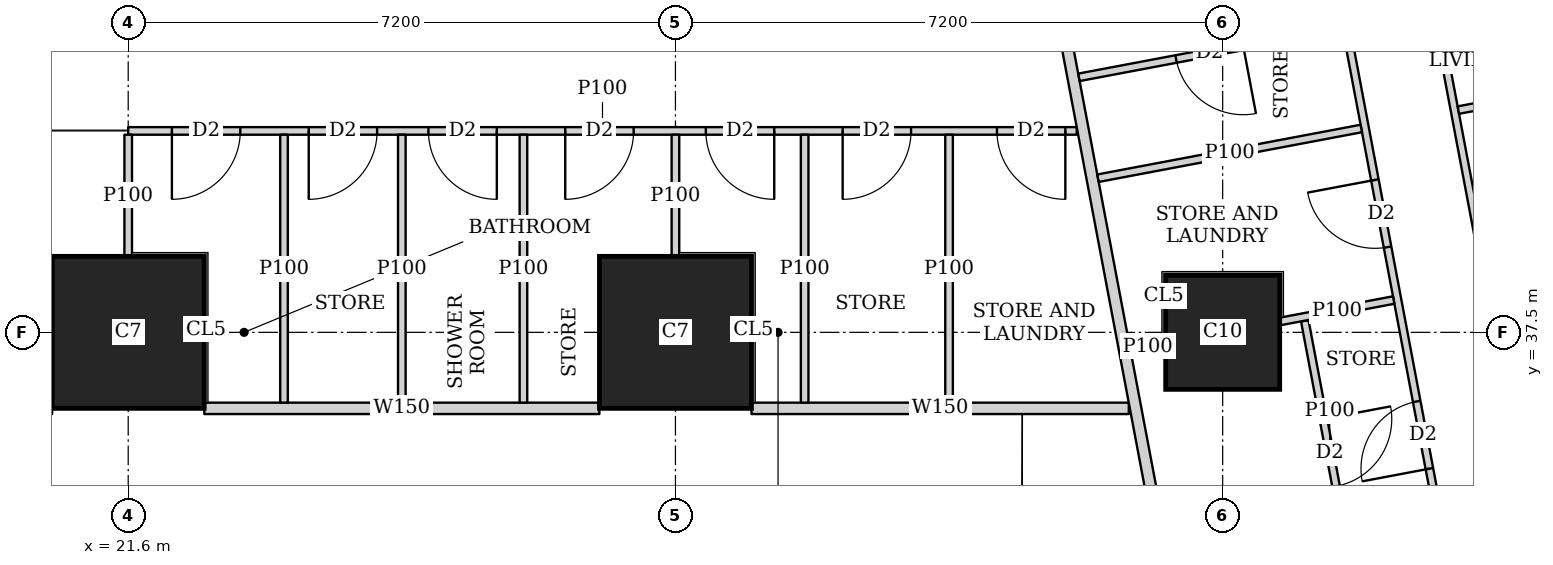
"""IFC4 building model, lengths in metres.
Left out: names, types, materials, properties, quantities, classifications, styles, units other than length and angle.
Written with IfcOpenShell. Run it as: python <this file> out.ifc"""

import sys

from ifc_helpers import new_model, si_unit, direction, frame, frame_2d, origin, origin_2d, place, context, subcontext, project, spatial, rectangle, extrude, element, fill, save


model = new_model("IFC4")
c1 = context("Model", 3, precision=1e-05, world=origin(), true_north=direction((0.0, 1.0)))
c2 = subcontext(c1, "Body", "Model", "MODEL_VIEW")
j1 = project(units=[si_unit("LENGTHUNIT", "METRE"), si_unit("PLANEANGLEUNIT", "RADIAN")], contexts=[c1])
p1 = place(None, origin())
s1 = spatial("IfcSite", under=j1, at=p1, CompositionType="ELEMENT")
p2 = place(p1, origin())
s2 = spatial("IfcBuilding", under=s1, at=p2, CompositionType="ELEMENT")
p3 = place(p2, frame((0.0, 0.0, 135.8)))
s3 = spatial("IfcBuildingStorey", under=s2, at=p3, CompositionType="ELEMENT", Elevation=135.8)
for number, where, z_axis, x_axis in (
    (1, (21.6, 37.5, 0.0), (0.0, 0.0, 1.0), (1.0, 0.0, 0.0)),
    (2, (28.8, 37.5, 0.0), (0.0, 0.0, 1.0), (1.0, 0.0, 0.0)),
):
    element("IfcColumn", number, at=place(p3, frame(where, z_axis=z_axis, x_axis=x_axis)), inside=s3, PredefinedType="COLUMN", context=c2, shape_type="SweptSolid", body=[
        extrude(rectangle(XDim=2.0, YDim=2.0, at=origin_2d()), origin(), (0.0, 0.0, 1.0), 3.75),
    ])
p4 = place(p3, frame((36.0, 37.5, 0.0), z_axis=(0.0, 0.0, 1.0), x_axis=(1.0, 0.0, 0.0)))
e3 = element("IfcColumn", 3, at=p4, inside=s3, PredefinedType="COLUMN", context=c2, shape_type="SweptSolid", body=[
    extrude(rectangle(XDim=1.5, YDim=1.5, at=origin_2d()), origin(), (0.0, 0.0, 1.0), 3.75),
])
p5 = place(p3, frame((22.601, 36.5, 0.0), z_axis=(0.0, 0.0, 1.0), x_axis=(1.0, 0.0, 0.0)))
e4 = element("IfcWall", 4, at=p5, inside=s3, PredefinedType="SOLIDWALL", context=c2, shape_type="SweptSolid", body=[
    extrude(rectangle(XDim=5.198, YDim=0.15, at=frame_2d((2.599, 0.0))), origin(), (0.0, 0.0, 1.0), 3.5),
])
p6 = place(p3, frame((29.801, 36.5, 0.0), z_axis=(0.0, 0.0, 1.0), x_axis=(1.0, 0.0, 0.0)))
e5 = element("IfcWall", 5, at=p6, inside=s3, PredefinedType="SOLIDWALL", context=c2, shape_type="SweptSolid", body=[
    extrude(rectangle(XDim=4.964, YDim=0.15, at=frame_2d((2.482, 0.0))), origin(), (0.0, 0.0, 1.0), 3.5),
])
p7 = place(p3, frame((33.623, 43.022, 0.0), z_axis=(0.0, 0.0, 1.0), x_axis=(0.185596841028, -0.98262597798, 0.0)))
e6 = element("IfcWall", 6, at=p7, inside=s3, PredefinedType="SOLIDWALL", context=c2, shape_type="SweptSolid", body=[
    extrude(rectangle(XDim=41.66, YDim=0.15, at=frame_2d((20.83, 0.0))), origin(), (0.0, 0.0, 1.0), 2.5),
])
p8 = place(p7, frame((20.242, 0.0, 0.0)))
e7 = element("IfcOpeningElement", 7, at=p8, cuts=e6, PredefinedType="OPENING", context=c2, shape_type="SweptSolid", body=[
    extrude(rectangle(XDim=1.0, YDim=2.1, at=frame_2d((0.5, 1.05))), frame((0.0, 0.085, 0.0), z_axis=(0.0, -1.0, 0.0), x_axis=(1.0, 0.0, 0.0)), (0.0, 0.0, 1.0), 0.17),
])
p9 = place(p7, frame((24.714, 0.0, 0.0)))
e8 = element("IfcOpeningElement", 8, at=p9, cuts=e6, PredefinedType="OPENING", context=c2, shape_type="SweptSolid", body=[
    extrude(rectangle(XDim=1.0, YDim=2.1, at=frame_2d((0.5, 1.05))), frame((0.0, 0.085, 0.0), z_axis=(0.0, -1.0, 0.0), x_axis=(1.0, 0.0, 0.0)), (0.0, 0.0, 1.0), 0.17),
])
p10 = place(p7, frame((31.206, 0.0, 0.0)))
e9 = element("IfcOpeningElement", 9, at=p10, cuts=e6, PredefinedType="OPENING", context=c2, shape_type="SweptSolid", body=[
    extrude(rectangle(XDim=1.0, YDim=2.1, at=frame_2d((0.5, 1.05))), frame((0.0, 0.085, 0.0), z_axis=(0.0, -1.0, 0.0), x_axis=(1.0, 0.0, 0.0)), (0.0, 0.0, 1.0), 0.17),
])
p11 = place(p3, frame((38.701, 42.27, 0.0), z_axis=(0.0, 0.0, 1.0), x_axis=(0.185640619081, -0.98261770824, 0.0)))
e10 = element("IfcWall", 10, at=p11, inside=s3, PredefinedType="PARTITIONING", context=c2, shape_type="SweptSolid", body=[
    extrude(rectangle(XDim=17.103, YDim=0.1, at=frame_2d((8.552, 0.0))), origin(), (0.0, 0.0, 1.0), 2.5),
])
p12 = place(p11, frame((16.053, 0.0, 0.0)))
e11 = element("IfcOpeningElement", 11, at=p12, cuts=e10, PredefinedType="OPENING", context=c2, shape_type="SweptSolid", body=[
    extrude(rectangle(XDim=0.9, YDim=2.1, at=frame_2d((0.45, 1.05))), frame((0.0, 0.06, 0.0), z_axis=(0.0, -1.0, 0.0), x_axis=(1.0, 0.0, 0.0)), (0.0, 0.0, 1.0), 0.12),
])
p13 = place(p11, frame((12.077, 0.0, 0.0)))
e12 = element("IfcOpeningElement", 12, at=p13, cuts=e10, PredefinedType="OPENING", context=c2, shape_type="SweptSolid", body=[
    extrude(rectangle(XDim=0.9, YDim=2.1, at=frame_2d((0.45, 1.05))), frame((0.0, 0.06, 0.0), z_axis=(0.0, -1.0, 0.0), x_axis=(1.0, 0.0, 0.0)), (0.0, 0.0, 1.0), 0.12),
])
p14 = place(p11, frame((8.42, 0.0, 0.0)))
e13 = element("IfcOpeningElement", 13, at=p14, cuts=e10, PredefinedType="OPENING", context=c2, shape_type="SweptSolid", body=[
    extrude(rectangle(XDim=0.9, YDim=2.1, at=frame_2d((0.45, 1.05))), frame((0.0, 0.06, 0.0), z_axis=(0.0, -1.0, 0.0), x_axis=(1.0, 0.0, 0.0)), (0.0, 0.0, 1.0), 0.12),
])
p15 = place(p11, frame((4.444, 0.0, 0.0)))
e14 = element("IfcOpeningElement", 14, at=p15, cuts=e10, PredefinedType="OPENING", context=c2, shape_type="SweptSolid", body=[
    extrude(rectangle(XDim=0.9, YDim=2.1, at=frame_2d((0.45, 1.05))), frame((0.0, 0.06, 0.0), z_axis=(0.0, -1.0, 0.0), x_axis=(1.0, 0.0, 0.0)), (0.0, 0.0, 1.0), 0.12),
])
p16 = place(p3, frame((37.411, 42.638, 0.0), z_axis=(0.0, 0.0, 1.0), x_axis=(0.185555586706, -0.982633769134, 0.0)))
e15 = element("IfcWall", 15, at=p16, inside=s3, PredefinedType="PARTITIONING", context=c2, shape_type="SweptSolid", body=[
    extrude(rectangle(XDim=17.704, YDim=0.1, at=frame_2d((8.852, 0.0))), origin(), (0.0, 0.0, 1.0), 2.5),
])
p17 = place(p16, frame((16.28, 0.0, 0.0)))
e16 = element("IfcOpeningElement", 16, at=p17, cuts=e15, PredefinedType="OPENING", context=c2, shape_type="SweptSolid", body=[
    extrude(rectangle(XDim=0.9, YDim=2.1, at=frame_2d((0.45, 1.05))), frame((0.0, 0.06, 0.0), z_axis=(0.0, -1.0, 0.0), x_axis=(1.0, 0.0, 0.0)), (0.0, 0.0, 1.0), 0.12),
])
p18 = place(p16, frame((12.688, 0.0, 0.0)))
e17 = element("IfcOpeningElement", 17, at=p18, cuts=e15, PredefinedType="OPENING", context=c2, shape_type="SweptSolid", body=[
    extrude(rectangle(XDim=0.9, YDim=2.1, at=frame_2d((0.45, 1.05))), frame((0.0, 0.06, 0.0), z_axis=(0.0, -1.0, 0.0), x_axis=(1.0, 0.0, 0.0)), (0.0, 0.0, 1.0), 0.12),
])
p19 = place(p16, frame((8.822, 0.0, 0.0)))
e18 = element("IfcOpeningElement", 18, at=p19, cuts=e15, PredefinedType="OPENING", context=c2, shape_type="SweptSolid", body=[
    extrude(rectangle(XDim=0.9, YDim=2.1, at=frame_2d((0.45, 1.05))), frame((0.0, 0.06, 0.0), z_axis=(0.0, -1.0, 0.0), x_axis=(1.0, 0.0, 0.0)), (0.0, 0.0, 1.0), 0.12),
])
p20 = place(p16, frame((3.188, 0.0, 0.0)))
e19 = element("IfcOpeningElement", 19, at=p20, cuts=e15, PredefinedType="OPENING", context=c2, shape_type="SweptSolid", body=[
    extrude(rectangle(XDim=0.9, YDim=2.1, at=frame_2d((0.45, 1.05))), frame((0.0, 0.06, 0.0), z_axis=(0.0, -1.0, 0.0), x_axis=(1.0, 0.0, 0.0)), (0.0, 0.0, 1.0), 0.12),
])
p21 = place(p16, frame((0.15, 0.0, 0.0)))
e20 = element("IfcOpeningElement", 20, at=p21, cuts=e15, PredefinedType="OPENING", context=c2, shape_type="SweptSolid", body=[
    extrude(rectangle(XDim=0.9, YDim=2.1, at=frame_2d((0.45, 1.05))), frame((0.0, 0.06, 0.0), z_axis=(0.0, -1.0, 0.0), x_axis=(1.0, 0.0, 0.0)), (0.0, 0.0, 1.0), 0.12),
])
p22 = place(p16, frame((14.371, 0.0, 0.0)))
e21 = element("IfcOpeningElement", 21, at=p22, cuts=e15, PredefinedType="OPENING", context=c2, shape_type="SweptSolid", body=[
    extrude(rectangle(XDim=0.9, YDim=2.1, at=frame_2d((0.45, 1.05))), frame((0.0, 0.06, 0.0), z_axis=(0.0, -1.0, 0.0), x_axis=(1.0, 0.0, 0.0)), (0.0, 0.0, 1.0), 0.12),
])
p23 = place(p16, frame((10.78, 0.0, 0.0)))
e22 = element("IfcOpeningElement", 22, at=p23, cuts=e15, PredefinedType="OPENING", context=c2, shape_type="SweptSolid", body=[
    extrude(rectangle(XDim=0.9, YDim=2.1, at=frame_2d((0.45, 1.05))), frame((0.0, 0.06, 0.0), z_axis=(0.0, -1.0, 0.0), x_axis=(1.0, 0.0, 0.0)), (0.0, 0.0, 1.0), 0.12),
])
p24 = place(p16, frame((6.154, 0.0, 0.0)))
e23 = element("IfcOpeningElement", 23, at=p24, cuts=e15, PredefinedType="OPENING", context=c2, shape_type="SweptSolid", body=[
    extrude(rectangle(XDim=0.9, YDim=2.1, at=frame_2d((0.45, 1.05))), frame((0.0, 0.06, 0.0), z_axis=(0.0, -1.0, 0.0), x_axis=(1.0, 0.0, 0.0)), (0.0, 0.0, 1.0), 0.12),
])
p25 = place(p3, frame((43.277, 41.212, 0.0), z_axis=(0.0, 0.0, 1.0), x_axis=(-0.982665405803, -0.185387972203, 0.0)))
e24 = element("IfcWall", 24, at=p25, inside=s3, PredefinedType="PARTITIONING", context=c2, shape_type="SweptSolid", body=[
    extrude(rectangle(XDim=4.25, YDim=0.1, at=frame_2d((2.125, 0.0))), origin(), (0.0, 0.0, 1.0), 2.1),
])
p26 = place(p3, frame((37.824, 40.182, 0.0), z_axis=(0.0, 0.0, 1.0), x_axis=(-0.982648794755, -0.185475998897, 0.0)))
e25 = element("IfcWall", 25, at=p26, inside=s3, PredefinedType="PARTITIONING", context=c2, shape_type="SweptSolid", body=[
    extrude(rectangle(XDim=3.525, YDim=0.1, at=frame_2d((1.763, 0.0))), origin(), (0.0, 0.0, 1.0), 3.5),
])
p27 = place(p3, frame((38.25, 37.925, 0.0), z_axis=(0.0, 0.0, 1.0), x_axis=(-0.982676595259, -0.18532865167, 0.0)))
e26 = element("IfcWall", 26, at=p27, inside=s3, PredefinedType="PARTITIONING", context=c2, shape_type="SweptSolid", body=[
    extrude(rectangle(XDim=1.516, YDim=0.1, at=frame_2d((0.758, 0.0))), origin(), (0.0, 0.0, 1.0), 3.5),
])
p28 = place(p3, frame((35.24, 37.357, 0.0), z_axis=(0.0, 0.0, 1.0), x_axis=(-0.982559813104, -0.18594680334, 0.0)))
e27 = element("IfcWall", 27, at=p28, inside=s3, PredefinedType="PARTITIONING", context=c2, shape_type="SweptSolid", body=[
    extrude(rectangle(XDim=0.462, YDim=0.1, at=frame_2d((0.231, 0.0))), origin(), (0.0, 0.0, 1.0), 3.5),
])
p29 = place(p3, frame((21.6, 40.15, 0.0), z_axis=(0.0, 0.0, 1.0), x_axis=(1.0, 0.0, 0.0)))
e28 = element("IfcWall", 28, at=p29, inside=s3, PredefinedType="PARTITIONING", context=c2, shape_type="SweptSolid", body=[
    extrude(rectangle(XDim=12.48, YDim=0.1, at=frame_2d((6.24, 0.0))), origin(), (0.0, 0.0, 1.0), 3.5),
])
p30 = place(p29, frame((0.575, 0.0, 0.0)))
e29 = element("IfcOpeningElement", 29, at=p30, cuts=e28, PredefinedType="OPENING", context=c2, shape_type="SweptSolid", body=[
    extrude(rectangle(XDim=0.9, YDim=2.1, at=frame_2d((0.45, 1.05))), frame((0.0, 0.06, 0.0), z_axis=(0.0, -1.0, 0.0), x_axis=(1.0, 0.0, 0.0)), (0.0, 0.0, 1.0), 0.12),
])
p31 = place(p29, frame((3.95, 0.0, 0.0)))
e30 = element("IfcOpeningElement", 30, at=p31, cuts=e28, PredefinedType="OPENING", context=c2, shape_type="SweptSolid", body=[
    extrude(rectangle(XDim=0.9, YDim=2.1, at=frame_2d((0.45, 1.05))), frame((0.0, 0.06, 0.0), z_axis=(0.0, -1.0, 0.0), x_axis=(1.0, 0.0, 0.0)), (0.0, 0.0, 1.0), 0.12),
])
p32 = place(p29, frame((7.6, 0.0, 0.0)))
e31 = element("IfcOpeningElement", 31, at=p32, cuts=e28, PredefinedType="OPENING", context=c2, shape_type="SweptSolid", body=[
    extrude(rectangle(XDim=0.9, YDim=2.1, at=frame_2d((0.45, 1.05))), frame((0.0, 0.06, 0.0), z_axis=(0.0, -1.0, 0.0), x_axis=(1.0, 0.0, 0.0)), (0.0, 0.0, 1.0), 0.12),
])
p33 = place(p29, frame((11.43, 0.0, 0.0)))
e32 = element("IfcOpeningElement", 32, at=p33, cuts=e28, PredefinedType="OPENING", context=c2, shape_type="SweptSolid", body=[
    extrude(rectangle(XDim=0.9, YDim=2.1, at=frame_2d((0.45, 1.05))), frame((0.0, 0.06, 0.0), z_axis=(0.0, -1.0, 0.0), x_axis=(1.0, 0.0, 0.0)), (0.0, 0.0, 1.0), 0.12),
])
p34 = place(p29, frame((2.375, 0.0, 0.0)))
e33 = element("IfcOpeningElement", 33, at=p34, cuts=e28, PredefinedType="OPENING", context=c2, shape_type="SweptSolid", body=[
    extrude(rectangle(XDim=0.9, YDim=2.1, at=frame_2d((0.45, 1.05))), frame((0.0, 0.06, 0.0), z_axis=(0.0, -1.0, 0.0), x_axis=(1.0, 0.0, 0.0)), (0.0, 0.0, 1.0), 0.12),
])
p35 = place(p29, frame((5.75, 0.0, 0.0)))
e34 = element("IfcOpeningElement", 34, at=p35, cuts=e28, PredefinedType="OPENING", context=c2, shape_type="SweptSolid", body=[
    extrude(rectangle(XDim=0.9, YDim=2.1, at=frame_2d((0.45, 1.05))), frame((0.0, 0.06, 0.0), z_axis=(0.0, -1.0, 0.0), x_axis=(1.0, 0.0, 0.0)), (0.0, 0.0, 1.0), 0.12),
])
p36 = place(p29, frame((9.4, 0.0, 0.0)))
e35 = element("IfcOpeningElement", 35, at=p36, cuts=e28, PredefinedType="OPENING", context=c2, shape_type="SweptSolid", body=[
    extrude(rectangle(XDim=0.9, YDim=2.1, at=frame_2d((0.45, 1.05))), frame((0.0, 0.06, 0.0), z_axis=(0.0, -1.0, 0.0), x_axis=(1.0, 0.0, 0.0)), (0.0, 0.0, 1.0), 0.12),
])
p37 = place(p3, frame((21.6, 38.501, 0.0), z_axis=(0.0, 0.0, 1.0), x_axis=(0.0, 1.0, 0.0)))
e36 = element("IfcWall", 36, at=p37, inside=s3, PredefinedType="PARTITIONING", context=c2, shape_type="SweptSolid", body=[
    extrude(rectangle(XDim=1.599, YDim=0.1, at=frame_2d((0.8, 0.0))), origin(), (0.0, 0.0, 1.0), 3.5),
])
p38 = place(p3, frame((25.2, 36.575, 0.0), z_axis=(0.0, 0.0, 1.0), x_axis=(0.0, 1.0, 0.0)))
e37 = element("IfcWall", 37, at=p38, inside=s3, PredefinedType="PARTITIONING", context=c2, shape_type="SweptSolid", body=[
    extrude(rectangle(XDim=3.525, YDim=0.1, at=frame_2d((1.763, 0.0))), origin(), (0.0, 0.0, 1.0), 3.5),
])
p39 = place(p3, frame((28.8, 38.501, 0.0), z_axis=(0.0, 0.0, 1.0), x_axis=(0.0, 1.0, 0.0)))
e38 = element("IfcWall", 38, at=p39, inside=s3, PredefinedType="PARTITIONING", context=c2, shape_type="SweptSolid", body=[
    extrude(rectangle(XDim=1.599, YDim=0.1, at=frame_2d((0.8, 0.0))), origin(), (0.0, 0.0, 1.0), 3.5),
])
for number, where, z_axis, x_axis in (
    (39, (32.4, 36.575, 0.0), (0.0, 0.0, 1.0), (0.0, 1.0, 0.0)),
    (40, (23.65, 36.575, 0.0), (0.0, 0.0, 1.0), (0.0, 1.0, 0.0)),
    (41, (26.8, 36.575, 0.0), (0.0, 0.0, 1.0), (0.0, 1.0, 0.0)),
    (42, (30.5, 36.575, 0.0), (0.0, 0.0, 1.0), (0.0, 1.0, 0.0)),
):
    element("IfcWall", number, at=place(p3, frame(where, z_axis=z_axis, x_axis=x_axis)), inside=s3, PredefinedType="PARTITIONING", context=c2, shape_type="SweptSolid", body=[
        extrude(rectangle(XDim=3.525, YDim=0.1, at=frame_2d((1.763, 0.0))), origin(), (0.0, 0.0, 1.0), 3.5),
    ])
p40 = place(p3, frame((37.08, 37.653, 0.0), z_axis=(0.0, 0.0, 1.0), x_axis=(0.185864634688, -0.982575359742, 0.0)))
e43 = element("IfcWall", 43, at=p40, inside=s3, PredefinedType="PARTITIONING", context=c2, shape_type="SweptSolid", body=[
    extrude(rectangle(XDim=3.535, YDim=0.1, at=frame_2d((1.767, 0.0))), origin(), (0.0, 0.0, 1.0), 3.5),
])
p41 = place(p40, frame((1.317, 0.0, 0.0)))
e44 = element("IfcOpeningElement", 44, at=p41, cuts=e43, PredefinedType="OPENING", context=c2, shape_type="SweptSolid", body=[
    extrude(rectangle(XDim=0.9, YDim=2.1, at=frame_2d((0.45, 1.05))), frame((0.0, 0.06, 0.0), z_axis=(0.0, -1.0, 0.0), x_axis=(1.0, 0.0, 0.0)), (0.0, 0.0, 1.0), 0.12),
])
p42 = place(p3, frame((37.573, 41.509, 0.0), z_axis=(0.0, 0.0, 1.0), x_axis=(-0.982638553676, -0.185530247748, 0.0)))
e45 = element("IfcWall", 45, at=p42, inside=s3, PredefinedType="PARTITIONING", context=c2, shape_type="SweptSolid", body=[
    extrude(rectangle(XDim=3.525, YDim=0.1, at=frame_2d((1.763, 0.0))), origin(), (0.0, 0.0, 1.0), 3.5),
])
p43 = place(p42, frame((1.325, 0.0, 0.0)))
e46 = element("IfcOpeningElement", 46, at=p43, cuts=e45, PredefinedType="OPENING", context=c2, shape_type="SweptSolid", body=[
    extrude(rectangle(XDim=0.9, YDim=2.1, at=frame_2d((0.45, 1.05))), frame((0.0, 0.06, 0.0), z_axis=(0.0, -1.0, 0.0), x_axis=(1.0, 0.0, 0.0)), (0.0, 0.0, 1.0), 0.12),
])
p44 = place(p20, origin())
e47 = element("IfcDoor", 47, at=p44, inside=s3, OperationType="SINGLE_SWING_RIGHT", PredefinedType="DOOR", context=c2, shape_type="SweptSolid", body=[
    extrude(rectangle(XDim=0.9, YDim=2.1, at=frame_2d((0.45, 1.05))), frame((0.0, 0.025, 0.0), z_axis=(0.0, -1.0, 0.0), x_axis=(1.0, 0.0, 0.0)), (0.0, 0.0, 1.0), 0.05),
])
fill(e19, e47)
p45 = place(p24, origin())
e48 = element("IfcDoor", 48, at=p45, inside=s3, OperationType="SINGLE_SWING_LEFT", PredefinedType="DOOR", context=c2, shape_type="SweptSolid", body=[
    extrude(rectangle(XDim=0.9, YDim=2.1, at=frame_2d((0.45, 1.05))), frame((0.0, 0.025, 0.0), z_axis=(0.0, -1.0, 0.0), x_axis=(1.0, 0.0, 0.0)), (0.0, 0.0, 1.0), 0.05),
])
fill(e23, e48)
p46 = place(p30, origin())
e49 = element("IfcDoor", 49, at=p46, inside=s3, OperationType="SINGLE_SWING_RIGHT", PredefinedType="DOOR", context=c2, shape_type="SweptSolid", body=[
    extrude(rectangle(XDim=0.9, YDim=2.1, at=frame_2d((0.45, 1.05))), frame((0.0, 0.025, 0.0), z_axis=(0.0, -1.0, 0.0), x_axis=(1.0, 0.0, 0.0)), (0.0, 0.0, 1.0), 0.05),
])
fill(e29, e49)
p47 = place(p31, origin())
e50 = element("IfcDoor", 50, at=p47, inside=s3, OperationType="SINGLE_SWING_LEFT", PredefinedType="DOOR", context=c2, shape_type="SweptSolid", body=[
    extrude(rectangle(XDim=0.9, YDim=2.1, at=frame_2d((0.45, 1.05))), frame((0.0, 0.025, 0.0), z_axis=(0.0, -1.0, 0.0), x_axis=(1.0, 0.0, 0.0)), (0.0, 0.0, 1.0), 0.05),
])
fill(e30, e50)
p48 = place(p32, origin())
e51 = element("IfcDoor", 51, at=p48, inside=s3, OperationType="SINGLE_SWING_LEFT", PredefinedType="DOOR", context=c2, shape_type="SweptSolid", body=[
    extrude(rectangle(XDim=0.9, YDim=2.1, at=frame_2d((0.45, 1.05))), frame((0.0, 0.025, 0.0), z_axis=(0.0, -1.0, 0.0), x_axis=(1.0, 0.0, 0.0)), (0.0, 0.0, 1.0), 0.05),
])
fill(e31, e51)
p49 = place(p33, origin())
e52 = element("IfcDoor", 52, at=p49, inside=s3, OperationType="SINGLE_SWING_LEFT", PredefinedType="DOOR", context=c2, shape_type="SweptSolid", body=[
    extrude(rectangle(XDim=0.9, YDim=2.1, at=frame_2d((0.45, 1.05))), frame((0.0, 0.025, 0.0), z_axis=(0.0, -1.0, 0.0), x_axis=(1.0, 0.0, 0.0)), (0.0, 0.0, 1.0), 0.05),
])
fill(e32, e52)
p50 = place(p34, origin())
e53 = element("IfcDoor", 53, at=p50, inside=s3, OperationType="SINGLE_SWING_RIGHT", PredefinedType="DOOR", context=c2, shape_type="SweptSolid", body=[
    extrude(rectangle(XDim=0.9, YDim=2.1, at=frame_2d((0.45, 1.05))), frame((0.0, 0.025, 0.0), z_axis=(0.0, -1.0, 0.0), x_axis=(1.0, 0.0, 0.0)), (0.0, 0.0, 1.0), 0.05),
])
fill(e33, e53)
p51 = place(p35, origin())
e54 = element("IfcDoor", 54, at=p51, inside=s3, OperationType="SINGLE_SWING_RIGHT", PredefinedType="DOOR", context=c2, shape_type="SweptSolid", body=[
    extrude(rectangle(XDim=0.9, YDim=2.1, at=frame_2d((0.45, 1.05))), frame((0.0, 0.025, 0.0), z_axis=(0.0, -1.0, 0.0), x_axis=(1.0, 0.0, 0.0)), (0.0, 0.0, 1.0), 0.05),
])
fill(e34, e54)
p52 = place(p36, origin())
e55 = element("IfcDoor", 55, at=p52, inside=s3, OperationType="SINGLE_SWING_RIGHT", PredefinedType="DOOR", context=c2, shape_type="SweptSolid", body=[
    extrude(rectangle(XDim=0.9, YDim=2.1, at=frame_2d((0.45, 1.05))), frame((0.0, 0.025, 0.0), z_axis=(0.0, -1.0, 0.0), x_axis=(1.0, 0.0, 0.0)), (0.0, 0.0, 1.0), 0.05),
])
fill(e35, e55)
p53 = place(p41, origin())
e56 = element("IfcDoor", 56, at=p53, inside=s3, OperationType="SINGLE_SWING_LEFT", PredefinedType="DOOR", context=c2, shape_type="SweptSolid", body=[
    extrude(rectangle(XDim=0.9, YDim=2.1, at=frame_2d((0.45, 1.05))), frame((0.0, 0.025, 0.0), z_axis=(0.0, -1.0, 0.0), x_axis=(1.0, 0.0, 0.0)), (0.0, 0.0, 1.0), 0.05),
])
fill(e44, e56)
p54 = place(p43, origin())
e57 = element("IfcDoor", 57, at=p54, inside=s3, OperationType="SINGLE_SWING_LEFT", PredefinedType="DOOR", context=c2, shape_type="SweptSolid", body=[
    extrude(rectangle(XDim=0.9, YDim=2.1, at=frame_2d((0.45, 1.05))), frame((0.0, 0.025, 0.0), z_axis=(0.0, -1.0, 0.0), x_axis=(1.0, 0.0, 0.0)), (0.0, 0.0, 1.0), 0.05),
])
fill(e46, e57)
save(model, sys.argv[1])
